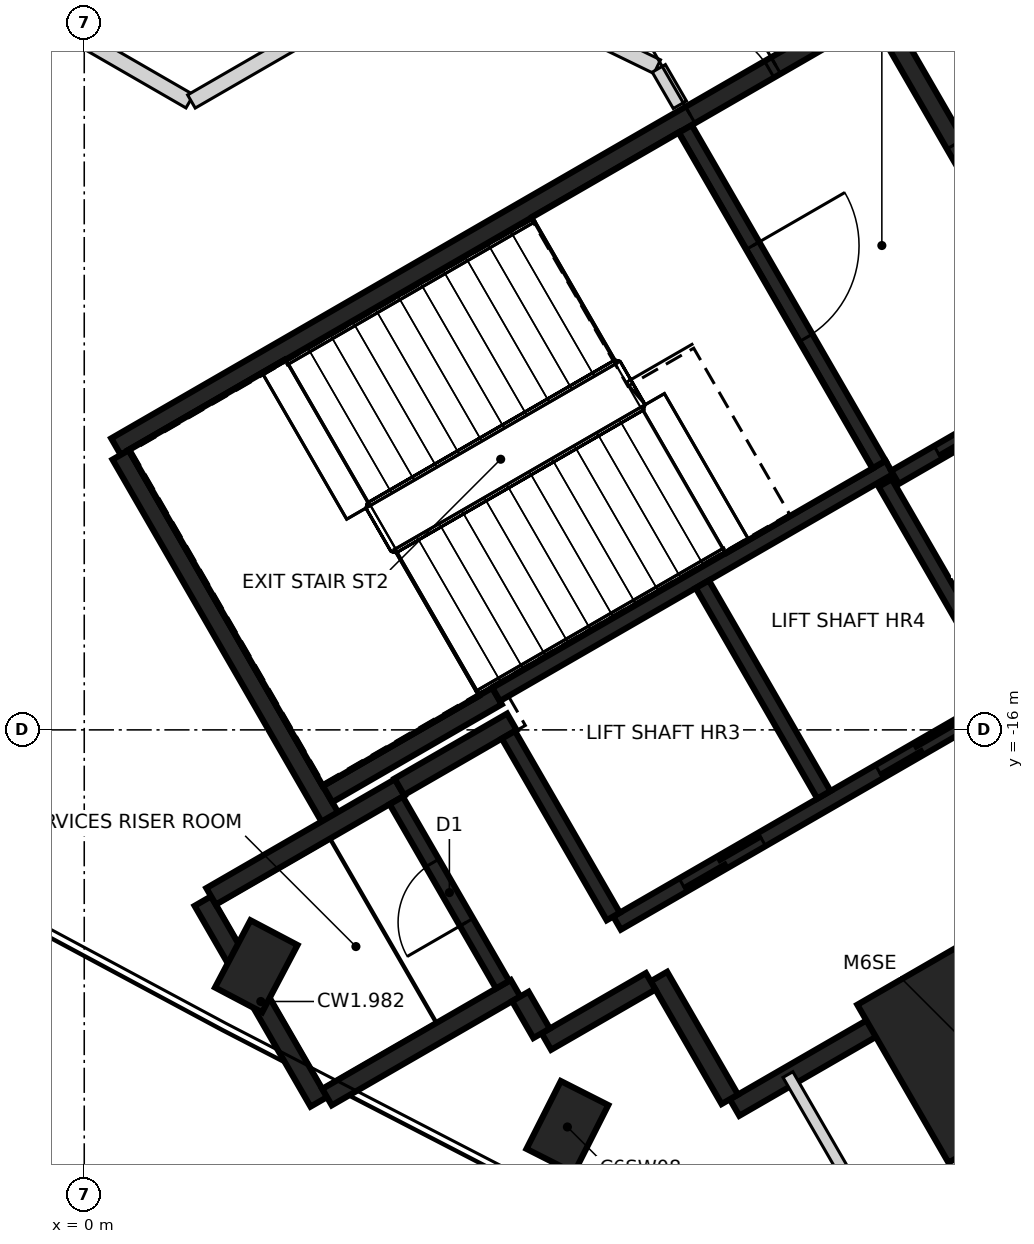
"""IFC4 building model, lengths in metres.
Left out: names, types, materials, properties, quantities, classifications, styles, units other than length and angle.
Written with IfcOpenShell. Run it as: python <this file> out.ifc"""

import sys

from ifc_helpers import new_model, si_unit, direction, frame, frame_2d, origin, origin_2d, place, context, subcontext, project, spatial, rectangle, extrude, element, fill, save


model = new_model("IFC4")
c1 = context("Model", 3, precision=1e-05, world=origin(), true_north=direction((0.0, 1.0)))
c2 = subcontext(c1, "Body", "Model", "MODEL_VIEW")
j1 = project(units=[si_unit("LENGTHUNIT", "METRE"), si_unit("PLANEANGLEUNIT", "RADIAN")], contexts=[c1])
p1 = place(None, origin())
s1 = spatial("IfcSite", under=j1, at=p1, CompositionType="ELEMENT")
p2 = place(p1, origin())
s2 = spatial("IfcBuilding", under=s1, at=p2, CompositionType="ELEMENT")
p3 = place(p2, frame((0.0, 0.0, 283.8)))
s3 = spatial("IfcBuildingStorey", under=s2, at=p3, CompositionType="ELEMENT", Elevation=283.8)
for number, where, z_axis, x_axis in (
    (1, (2.263, -19.11, -0.35), (0.0, 0.0, 1.0), (0.466, 0.885, 0.0)),
    (2, (6.356, -21.224, -0.35), (0.0, 0.0, 1.0), (0.452, 0.892, 0.0)),
):
    element("IfcColumn", number, at=place(p3, frame(where, z_axis=z_axis, x_axis=x_axis)), inside=s3, PredefinedType="COLUMN", context=c2, shape_type="SweptSolid", body=[
        extrude(rectangle(XDim=1.0, YDim=0.7, at=origin_2d()), origin(), (0.0, 0.0, 1.0), 7.2),
    ])
p4 = place(p3, frame((11.637, -20.155, -0.35), z_axis=(0.0, 0.0, 1.0), x_axis=(-0.5, 0.866025403784, 0.0)))
e3 = element("IfcColumn", 3, at=p4, inside=s3, PredefinedType="COLUMN", context=c2, shape_type="SweptSolid", body=[
    extrude(rectangle(XDim=2.4, YDim=2.0, at=origin_2d()), origin(), (0.0, 0.0, 1.0), 7.2),
])
p5 = place(p3, frame((0.417, -12.273, 0.0), z_axis=(0.0, 0.0, 1.0), x_axis=(0.866021906294, 0.500006057782, 0.0)))
e4 = element("IfcWall", 4, at=p5, inside=s3, PredefinedType="SHEAR", context=c2, shape_type="SweptSolid", body=[
    extrude(rectangle(XDim=11.55, YDim=0.25, at=frame_2d((5.775, 0.0))), origin(), (0.0, 0.0, 1.0), 6.85),
])
p6 = place(p5, frame((10.025, 0.0, 0.0)))
e5 = element("IfcOpeningElement", 5, at=p6, cuts=e4, PredefinedType="OPENING", context=c2, shape_type="SweptSolid", body=[
    extrude(rectangle(XDim=1.2, YDim=2.1, at=frame_2d((0.6, 1.05))), frame((0.0, 0.135, 0.0), z_axis=(0.0, -1.0, 0.0), x_axis=(1.0, 0.0, 0.0)), (0.0, 0.0, 1.0), 0.27),
])
p7 = place(p5, frame((8.725, 0.0, 0.0)))
e6 = element("IfcOpeningElement", 6, at=p7, cuts=e4, PredefinedType="OPENING", context=c2, shape_type="SweptSolid", body=[
    extrude(rectangle(XDim=1.2, YDim=2.1, at=frame_2d((0.6, 1.05))), frame((0.0, 0.135, 0.0), z_axis=(0.0, -1.0, 0.0), x_axis=(1.0, 0.0, 0.0)), (0.0, 0.0, 1.0), 0.27),
])
p8 = place(p3, frame((16.133, -16.594, 0.0), z_axis=(0.0, 0.0, 1.0), x_axis=(-0.866022959057, -0.500004234368, 0.0)))
e7 = element("IfcWall", 7, at=p8, inside=s3, PredefinedType="SHEAR", context=c2, shape_type="SweptSolid", body=[
    extrude(rectangle(XDim=8.75, YDim=0.25, at=frame_2d((4.375, 0.0))), origin(), (0.0, 0.0, 1.0), 6.85),
])
p9 = place(p8, frame((3.425, 0.0, 0.0)))
e8 = element("IfcOpeningElement", 8, at=p9, cuts=e7, PredefinedType="OPENING", context=c2, shape_type="SweptSolid", body=[
    extrude(rectangle(XDim=0.9, YDim=2.1, at=frame_2d((0.45, 1.05))), frame((0.0, 0.135, 0.0), z_axis=(0.0, -1.0, 0.0), x_axis=(1.0, 0.0, 0.0)), (0.0, 0.0, 1.0), 0.27),
])
p10 = place(p3, frame((3.235, -17.153, 0.0), z_axis=(0.0, 0.0, 1.0), x_axis=(-0.500008851346, 0.866020293397, 0.0)))
e9 = element("IfcWall", 9, at=p10, inside=s3, PredefinedType="SHEAR", context=c2, shape_type="SweptSolid", body=[
    extrude(rectangle(XDim=5.51, YDim=0.25, at=frame_2d((2.755, 0.0))), origin(), (0.0, 0.0, 1.0), 6.85),
])
p11 = place(p3, frame((10.483, -6.606, 0.0), z_axis=(0.0, 0.0, 1.0), x_axis=(0.49999885962, -0.866026062182, 0.0)))
e10 = element("IfcWall", 10, at=p11, inside=s3, PredefinedType="SHEAR", context=c2, shape_type="SweptSolid", body=[
    extrude(rectangle(XDim=5.225, YDim=0.25, at=frame_2d((2.612, 0.0))), origin(), (0.0, 0.0, 1.0), 6.85),
])
p12 = place(p11, frame((1.95, 0.0, 0.0)))
e11 = element("IfcOpeningElement", 11, at=p12, cuts=e10, PredefinedType="OPENING", context=c2, shape_type="SweptSolid", body=[
    extrude(rectangle(XDim=1.2, YDim=2.1, at=frame_2d((0.6, 1.05))), frame((0.0, 0.135, 0.0), z_axis=(0.0, -1.0, 0.0), x_axis=(1.0, 0.0, 0.0)), (0.0, 0.0, 1.0), 0.27),
])
p13 = place(p3, frame((3.085, -20.894, 0.0), z_axis=(0.0, 0.0, 1.0), x_axis=(-0.499978833458, 0.866037623948, 0.0)))
e12 = element("IfcWall", 12, at=p13, inside=s3, PredefinedType="SHEAR", context=c2, shape_type="SweptSolid", body=[
    extrude(rectangle(XDim=3.05, YDim=0.25, at=frame_2d((1.525, 0.0))), origin(), (0.0, 0.0, 1.0), 6.85),
])
p14 = place(p3, frame((1.669, -18.19, 0.0), z_axis=(0.0, 0.0, 1.0), x_axis=(0.866042235819, 0.499970844928, 0.0)))
e13 = element("IfcWall", 13, at=p14, inside=s3, PredefinedType="SHEAR", context=c2, shape_type="SweptSolid", body=[
    extrude(rectangle(XDim=2.865, YDim=0.25, at=frame_2d((1.432, 0.0))), origin(), (0.0, 0.0, 1.0), 6.85),
])
p15 = place(p3, frame((5.675, -19.399, 0.0), z_axis=(0.0, 0.0, 1.0), x_axis=(-0.866026637627, -0.499997862916, 0.0)))
e14 = element("IfcWall", 14, at=p15, inside=s3, PredefinedType="SHEAR", context=c2, shape_type="SweptSolid", body=[
    extrude(rectangle(XDim=2.865, YDim=0.25, at=frame_2d((1.432, 0.0))), origin(), (0.0, 0.0, 1.0), 6.85),
])
p16 = place(p3, frame((5.431, -15.556, 0.0), z_axis=(0.0, 0.0, 1.0), x_axis=(-0.866022940537, -0.500004266446, 0.0)))
e15 = element("IfcWall", 15, at=p16, inside=s3, PredefinedType="SHEAR", context=c2, shape_type="SweptSolid", body=[
    extrude(rectangle(XDim=2.575, YDim=0.25, at=frame_2d((1.287, 0.0))), origin(), (0.0, 0.0, 1.0), 6.85),
])
p17 = place(p3, frame((8.493, -20.86, 0.0), z_axis=(0.0, 0.0, 1.0), x_axis=(-0.500039802285, 0.866002422705, 0.0)))
e16 = element("IfcWall", 16, at=p17, inside=s3, PredefinedType="SHEAR", context=c2, shape_type="SweptSolid", body=[
    extrude(rectangle(XDim=1.865, YDim=0.25, at=frame_2d((0.932, 0.0))), origin(), (0.0, 0.0, 1.0), 6.85),
])
p18 = place(p3, frame((4.145, -16.749, 0.0), z_axis=(0.0, 0.0, 1.0), x_axis=(0.866038183914, 0.499977863513, 0.0)))
e17 = element("IfcWall", 17, at=p18, inside=s3, PredefinedType="SHEAR", context=c2, shape_type="SweptSolid", body=[
    extrude(rectangle(XDim=1.71, YDim=0.25, at=frame_2d((0.855, 0.0))), origin(), (0.0, 0.0, 1.0), 6.85),
])
p19 = place(p3, frame((7.452, -19.308, 0.0), z_axis=(0.0, 0.0, 1.0), x_axis=(-0.866044474677, -0.49996696679, 0.0)))
e18 = element("IfcWall", 18, at=p19, inside=s3, PredefinedType="SHEAR", context=c2, shape_type="SweptSolid", body=[
    extrude(rectangle(XDim=1.584, YDim=0.25, at=frame_2d((0.792, 0.0))), origin(), (0.0, 0.0, 1.0), 6.85),
])
p20 = place(p3, frame((6.017, -19.992, 0.0), z_axis=(0.0, 0.0, 1.0), x_axis=(-0.500364886717, 0.865814633822, 0.0)))
e19 = element("IfcWall", 19, at=p20, inside=s3, PredefinedType="SHEAR", context=c2, shape_type="SweptSolid", body=[
    extrude(rectangle(XDim=0.559, YDim=0.25, at=frame_2d((0.28, 0.0))), origin(), (0.0, 0.0, 1.0), 6.85),
])
p21 = place(p3, frame((5.419, -15.534, 0.0), z_axis=(0.0, 0.0, 1.0), x_axis=(0.866029065029, 0.499993658486, 0.0)))
e20 = element("IfcWall", 20, at=p21, inside=s3, PredefinedType="SHEAR", context=c2, shape_type="SweptSolid", body=[
    extrude(rectangle(XDim=5.974, YDim=0.2, at=frame_2d((2.987, 0.0))), origin(), (0.0, 0.0, 1.0), 6.85),
])
p22 = place(p3, frame((7.01, -18.542, 0.0), z_axis=(0.0, 0.0, 1.0), x_axis=(0.866030299012, 0.499991521122, 0.0)))
e21 = element("IfcWall", 21, at=p22, inside=s3, PredefinedType="SHEAR", context=c2, shape_type="SweptSolid", body=[
    extrude(rectangle(XDim=6.1, YDim=0.2, at=frame_2d((3.05, 0.0))), origin(), (0.0, 0.0, 1.0), 6.85),
])
p23 = place(p22, frame((1.0, 0.0, 0.0)))
e22 = element("IfcOpeningElement", 22, at=p23, cuts=e21, PredefinedType="OPENING", context=c2, shape_type="SweptSolid", body=[
    extrude(rectangle(XDim=1.2, YDim=2.1, at=frame_2d((0.6, 1.05))), frame((0.0, 0.11, 0.0), z_axis=(0.0, -1.0, 0.0), x_axis=(1.0, 0.0, 0.0)), (0.0, 0.0, 1.0), 0.22),
])
p24 = place(p22, frame((3.982, 0.0, 0.0)))
e23 = element("IfcOpeningElement", 23, at=p24, cuts=e21, PredefinedType="OPENING", context=c2, shape_type="SweptSolid", body=[
    extrude(rectangle(XDim=1.2, YDim=2.1, at=frame_2d((0.6, 1.05))), frame((0.0, 0.11, 0.0), z_axis=(0.0, -1.0, 0.0), x_axis=(1.0, 0.0, 0.0)), (0.0, 0.0, 1.0), 0.22),
])
p25 = place(p3, frame((7.906, -8.094, 0.0), z_axis=(0.0, 0.0, 1.0), x_axis=(0.500027839223, -0.866009330205, 0.0)))
e24 = element("IfcWall", 24, at=p25, inside=s3, PredefinedType="SHEAR", context=c2, shape_type="SweptSolid", body=[
    extrude(rectangle(XDim=5.098, YDim=0.2, at=frame_2d((2.549, 0.0))), origin(), (0.0, 0.0, 1.0), 6.85),
])
p26 = place(p25, frame((1.774, 0.0, 0.0)))
e25 = element("IfcOpeningElement", 25, at=p26, cuts=e24, PredefinedType="OPENING", context=c2, shape_type="SweptSolid", body=[
    extrude(rectangle(XDim=1.4, YDim=2.1, at=frame_2d((0.7, 1.05))), frame((0.0, 0.11, 0.0), z_axis=(0.0, -1.0, 0.0), x_axis=(1.0, 0.0, 0.0)), (0.0, 0.0, 1.0), 0.22),
])
p27 = place(p3, frame((8.132, -14.084, 0.0), z_axis=(0.0, 0.0, 1.0), x_axis=(0.499997778408, -0.866026686418, 0.0)))
e26 = element("IfcWall", 26, at=p27, inside=s3, PredefinedType="SHEAR", context=c2, shape_type="SweptSolid", body=[
    extrude(rectangle(XDim=3.198, YDim=0.2, at=frame_2d((1.599, 0.0))), origin(), (0.0, 0.0, 1.0), 6.85),
])
p28 = place(p3, frame((5.503, -19.352, 0.0), z_axis=(0.0, 0.0, 1.0), x_axis=(-0.499986818241, 0.866033014143, 0.0)))
e27 = element("IfcWall", 27, at=p28, inside=s3, PredefinedType="SHEAR", context=c2, shape_type="SweptSolid", body=[
    extrude(rectangle(XDim=2.798, YDim=0.2, at=frame_2d((1.399, 0.0))), origin(), (0.0, 0.0, 1.0), 6.85),
])
p29 = place(p28, frame((0.949, 0.0, 0.0)))
e28 = element("IfcOpeningElement", 28, at=p29, cuts=e27, PredefinedType="OPENING", context=c2, shape_type="SweptSolid", body=[
    extrude(rectangle(XDim=0.9, YDim=2.1, at=frame_2d((0.45, 1.05))), frame((0.0, 0.11, 0.0), z_axis=(0.0, -1.0, 0.0), x_axis=(1.0, 0.0, 0.0)), (0.0, 0.0, 1.0), 0.22),
])
p30 = place(p3, frame((6.96, -18.455, 0.0), z_axis=(0.0, 0.0, 1.0), x_axis=(-0.499926705758, 0.866067716099, 0.0)))
e29 = element("IfcWall", 29, at=p30, inside=s3, PredefinedType="SHEAR", context=c2, shape_type="SweptSolid", body=[
    extrude(rectangle(XDim=2.759, YDim=0.2, at=frame_2d((1.38, 0.0))), origin(), (0.0, 0.0, 1.0), 6.85),
])
p31 = place(p3, frame((12.088, -15.437, 0.0), z_axis=(0.0, 0.0, 1.0), x_axis=(-0.500026960575, 0.86600983753, 0.0)))
e30 = element("IfcWall", 30, at=p31, inside=s3, PredefinedType="SHEAR", context=c2, shape_type="SweptSolid", body=[
    extrude(rectangle(XDim=3.1, YDim=0.2, at=frame_2d((1.55, 0.0))), origin(), (0.0, 0.0, 1.0), 6.85),
])
p32 = place(p3, frame((10.666, -12.678, 0.0), z_axis=(0.0, 0.0, 1.0), x_axis=(0.866018407898, 0.500012117035, 0.0)))
e31 = element("IfcWall", 31, at=p32, inside=s3, PredefinedType="SHEAR", context=c2, shape_type="SweptSolid", body=[
    extrude(rectangle(XDim=2.651, YDim=0.2, at=frame_2d((1.325, 0.0))), origin(), (0.0, 0.0, 1.0), 6.85),
])
p33 = place(p32, frame((0.652, 0.0, 0.0)))
e32 = element("IfcOpeningElement", 32, at=p33, cuts=e31, PredefinedType="OPENING", context=c2, shape_type="SweptSolid", body=[
    extrude(rectangle(XDim=1.3, YDim=2.1, at=frame_2d((0.65, 1.05))), frame((0.0, 0.11, 0.0), z_axis=(0.0, -1.0, 0.0), x_axis=(1.0, 0.0, 0.0)), (0.0, 0.0, 1.0), 0.22),
])
p34 = place(p3, frame((15.896, -20.282, 0.0), z_axis=(0.0, 0.0, 1.0), x_axis=(-0.866017493347, -0.500013701029, 0.0)))
e33 = element("IfcWall", 33, at=p34, inside=s3, PredefinedType="PARTITIONING", context=c2, shape_type="SweptSolid", body=[
    extrude(rectangle(XDim=5.95, YDim=0.15, at=frame_2d((2.975, 0.0))), origin(), (0.0, 0.0, 1.0), 6.85),
])
p35 = place(p3, frame((10.808, -23.219, 0.0), z_axis=(0.0, 0.0, 1.0), x_axis=(-0.500026960575, 0.86600983753, 0.0)))
e34 = element("IfcWall", 34, at=p35, inside=s3, PredefinedType="PARTITIONING", context=c2, shape_type="SweptSolid", body=[
    extrude(rectangle(XDim=3.1, YDim=0.15, at=frame_2d((1.55, 0.0))), origin(), (0.0, 0.0, 1.0), 6.85),
])
p36 = place(p3, frame((-6.895, -2.948, 0.0), z_axis=(0.0, 0.0, 1.0), x_axis=(0.865991331413, -0.500059010435, 0.0)))
e35 = element("IfcWall", 35, at=p36, inside=s3, PredefinedType="PARTITIONING", context=c2, shape_type="SweptSolid", body=[
    extrude(rectangle(XDim=9.565, YDim=0.2, at=frame_2d((4.783, 0.0))), origin(), (0.0, 0.0, 1.0), 6.85),
])
p37 = place(p36, frame((0.879, 0.0, 0.0)))
e36 = element("IfcOpeningElement", 36, at=p37, cuts=e35, PredefinedType="OPENING", context=c2, shape_type="SweptSolid", body=[
    extrude(rectangle(XDim=0.8, YDim=2.1, at=frame_2d((0.4, 1.05))), frame((0.0, 0.11, 0.0), z_axis=(0.0, -1.0, 0.0), x_axis=(1.0, 0.0, 0.0)), (0.0, 0.0, 1.0), 0.22),
])
p38 = place(p36, frame((3.123, 0.0, 0.0)))
e37 = element("IfcOpeningElement", 37, at=p38, cuts=e35, PredefinedType="OPENING", context=c2, shape_type="SweptSolid", body=[
    extrude(rectangle(XDim=0.8, YDim=2.1, at=frame_2d((0.4, 1.05))), frame((0.0, 0.11, 0.0), z_axis=(0.0, -1.0, 0.0), x_axis=(1.0, 0.0, 0.0)), (0.0, 0.0, 1.0), 0.22),
])
p39 = place(p36, frame((6.526, 0.0, 0.0)))
e38 = element("IfcOpeningElement", 38, at=p39, cuts=e35, PredefinedType="OPENING", context=c2, shape_type="SweptSolid", body=[
    extrude(rectangle(XDim=1.0, YDim=2.1, at=frame_2d((0.5, 1.05))), frame((0.0, 0.11, 0.0), z_axis=(0.0, -1.0, 0.0), x_axis=(1.0, 0.0, 0.0)), (0.0, 0.0, 1.0), 0.22),
])
p40 = place(p3, frame((1.41, -7.733, 0.0), z_axis=(0.0, 0.0, 1.0), x_axis=(0.865821381066, 0.50035321133, 0.0)))
e39 = element("IfcWall", 39, at=p40, inside=s3, PredefinedType="PARTITIONING", context=c2, shape_type="SweptSolid", body=[
    extrude(rectangle(XDim=4.411, YDim=0.2, at=frame_2d((2.206, 0.0))), origin(), (0.0, 0.0, 1.0), 6.85),
])
p41 = place(p3, frame((5.439, -6.255, 0.0), z_axis=(0.0, 0.0, 1.0), x_axis=(0.899432970097, -0.437058728665, 0.0)))
e40 = element("IfcWall", 40, at=p41, inside=s3, PredefinedType="PARTITIONING", context=c2, shape_type="SweptSolid", body=[
    extrude(rectangle(XDim=2.334, YDim=0.2, at=frame_2d((1.167, 0.0))), origin(), (0.0, 0.0, 1.0), 6.85),
])
p42 = place(p3, frame((7.559, -7.297, 0.0), z_axis=(0.0, 0.0, 1.0), x_axis=(0.500740595022, -0.86559739862, 0.0)))
e41 = element("IfcWall", 41, at=p42, inside=s3, PredefinedType="PARTITIONING", context=c2, shape_type="SweptSolid", body=[
    extrude(rectangle(XDim=0.553, YDim=0.2, at=frame_2d((0.277, 0.0))), origin(), (0.0, 0.0, 1.0), 6.85),
])
p43 = place(p33, origin())
e42 = element("IfcDoor", 42, at=p43, inside=s3, OperationType="SLIDING_TO_LEFT", PredefinedType="DOOR", context=c2, shape_type="SweptSolid", body=[
    extrude(rectangle(XDim=1.3, YDim=2.1, at=frame_2d((0.65, 1.05))), frame((0.0, 0.025, 0.0), z_axis=(0.0, -1.0, 0.0), x_axis=(1.0, 0.0, 0.0)), (0.0, 0.0, 1.0), 0.05),
])
fill(e32, e42)
p44 = place(p23, origin())
e43 = element("IfcDoor", 43, at=p44, inside=s3, OperationType="DOUBLE_DOOR_SLIDING", PredefinedType="DOOR", context=c2, shape_type="SweptSolid", body=[
    extrude(rectangle(XDim=1.2, YDim=2.1, at=frame_2d((0.6, 1.05))), frame((0.0, 0.025, 0.0), z_axis=(0.0, -1.0, 0.0), x_axis=(1.0, 0.0, 0.0)), (0.0, 0.0, 1.0), 0.05),
])
fill(e22, e43)
p45 = place(p24, origin())
e44 = element("IfcDoor", 44, at=p45, inside=s3, OperationType="DOUBLE_DOOR_SLIDING", PredefinedType="DOOR", context=c2, shape_type="SweptSolid", body=[
    extrude(rectangle(XDim=1.2, YDim=2.1, at=frame_2d((0.6, 1.05))), frame((0.0, 0.025, 0.0), z_axis=(0.0, -1.0, 0.0), x_axis=(1.0, 0.0, 0.0)), (0.0, 0.0, 1.0), 0.05),
])
fill(e23, e44)
p46 = place(p6, origin())
e45 = element("IfcDoor", 45, at=p46, inside=s3, OperationType="SINGLE_SWING_LEFT", PredefinedType="DOOR", context=c2, shape_type="SweptSolid", body=[
    extrude(rectangle(XDim=1.2, YDim=2.1, at=frame_2d((0.6, 1.05))), frame((0.0, 0.025, 0.0), z_axis=(0.0, -1.0, 0.0), x_axis=(1.0, 0.0, 0.0)), (0.0, 0.0, 1.0), 0.05),
])
fill(e5, e45)
p47 = place(p7, origin())
e46 = element("IfcDoor", 46, at=p47, inside=s3, OperationType="SINGLE_SWING_RIGHT", PredefinedType="DOOR", context=c2, shape_type="SweptSolid", body=[
    extrude(rectangle(XDim=1.2, YDim=2.1, at=frame_2d((0.6, 1.05))), frame((0.0, 0.025, 0.0), z_axis=(0.0, -1.0, 0.0), x_axis=(1.0, 0.0, 0.0)), (0.0, 0.0, 1.0), 0.05),
])
fill(e6, e46)
p48 = place(p12, origin())
e47 = element("IfcDoor", 47, at=p48, inside=s3, OperationType="SINGLE_SWING_LEFT", PredefinedType="DOOR", context=c2, shape_type="SweptSolid", body=[
    extrude(rectangle(XDim=1.2, YDim=2.1, at=frame_2d((0.6, 1.05))), frame((0.0, 0.025, 0.0), z_axis=(0.0, -1.0, 0.0), x_axis=(1.0, 0.0, 0.0)), (0.0, 0.0, 1.0), 0.05),
])
fill(e11, e47)
p49 = place(p26, origin())
e48 = element("IfcDoor", 48, at=p49, inside=s3, OperationType="SINGLE_SWING_RIGHT", PredefinedType="DOOR", context=c2, shape_type="SweptSolid", body=[
    extrude(rectangle(XDim=1.4, YDim=2.1, at=frame_2d((0.7, 1.05))), frame((0.0, 0.025, 0.0), z_axis=(0.0, -1.0, 0.0), x_axis=(1.0, 0.0, 0.0)), (0.0, 0.0, 1.0), 0.05),
])
fill(e25, e48)
p50 = place(p29, origin())
e49 = element("IfcDoor", 49, at=p50, inside=s3, OperationType="SINGLE_SWING_LEFT", PredefinedType="DOOR", context=c2, shape_type="SweptSolid", body=[
    extrude(rectangle(XDim=0.9, YDim=2.1, at=frame_2d((0.45, 1.05))), frame((0.0, 0.025, 0.0), z_axis=(0.0, -1.0, 0.0), x_axis=(1.0, 0.0, 0.0)), (0.0, 0.0, 1.0), 0.05),
])
fill(e28, e49)
save(model, sys.argv[1])
